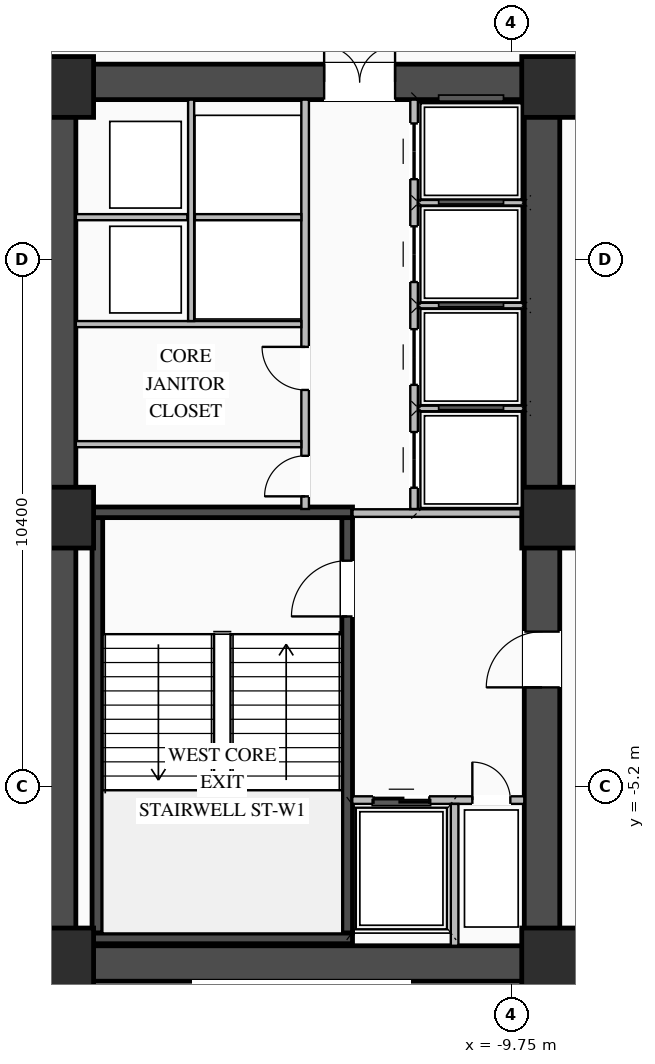
"""IFC4 building model, lengths in metres.
Left out: names, types, materials, properties, quantities, classifications, styles, units other than length and angle.
Written with IfcOpenShell. Run it as: python <this file> out.ifc"""

import sys

from ifc_helpers import new_model, si_unit, direction, frame, frame_2d, origin, origin_2d, place, context, subcontext, project, spatial, rectangle, extrude, element, fill, save


model = new_model("IFC4")
c1 = context("Model", 3, precision=1e-05, world=origin(), true_north=direction((0.0, 1.0)))
c2 = subcontext(c1, "Body", "Model", "MODEL_VIEW")
j1 = project(units=[si_unit("LENGTHUNIT", "METRE"), si_unit("PLANEANGLEUNIT", "RADIAN")], contexts=[c1])
p1 = place(None, origin())
s1 = spatial("IfcSite", under=j1, at=p1, CompositionType="ELEMENT")
p2 = place(p1, origin())
s2 = spatial("IfcBuilding", under=s1, at=p2, CompositionType="ELEMENT")
p3 = place(p2, frame((0.0, 0.0, 14.1)))
s3 = spatial("IfcBuildingStorey", under=s2, at=p3, CompositionType="ELEMENT", Elevation=14.1)
p4 = place(p3, frame((-19.05, -8.7, 0.0), z_axis=(0.0, 0.0, 1.0), x_axis=(1.0, 0.0, 0.0)))
e1 = element("IfcWall", 1, at=p4, inside=s3, PredefinedType="SHEAR", context=c2, shape_type="SweptSolid", body=[
    extrude(rectangle(XDim=10.25, YDim=0.7, at=frame_2d((5.125, 0.0))), origin(), (0.0, 0.0, 1.0), 4.25),
])
p5 = place(p3, frame((-19.05, 8.7, 0.0), z_axis=(0.0, 0.0, 1.0), x_axis=(1.0, 0.0, 0.0)))
e2 = element("IfcWall", 2, at=p5, inside=s3, PredefinedType="SHEAR", context=c2, shape_type="SweptSolid", body=[
    extrude(rectangle(XDim=10.25, YDim=0.7, at=frame_2d((5.125, 0.0))), origin(), (0.0, 0.0, 1.0), 4.25),
])
p6 = place(p5, frame((5.6, 0.0, 0.0)))
e3 = element("IfcOpeningElement", 3, at=p6, cuts=e2, PredefinedType="OPENING", context=c2, shape_type="SweptSolid", body=[
    extrude(rectangle(XDim=1.4, YDim=2.05, at=frame_2d((0.7, 1.025))), frame((0.0, 0.36, 0.0), z_axis=(0.0, -1.0, 0.0), x_axis=(1.0, 0.0, 0.0)), (0.0, 0.0, 1.0), 0.72),
])
p7 = place(p3, frame((-18.7, -8.35, 0.0), z_axis=(0.0, 0.0, 1.0), x_axis=(0.0, 1.0, 0.0)))
e4 = element("IfcWall", 4, at=p7, inside=s3, PredefinedType="SHEAR", context=c2, shape_type="SweptSolid", body=[
    extrude(rectangle(XDim=16.7, YDim=0.7, at=frame_2d((8.35, 0.0))), origin(), (0.0, 0.0, 1.0), 4.25),
])
p8 = place(p3, frame((-9.15, -8.35, 0.0), z_axis=(0.0, 0.0, 1.0), x_axis=(0.0, 1.0, 0.0)))
e5 = element("IfcWall", 5, at=p8, inside=s3, PredefinedType="SHEAR", context=c2, shape_type="SweptSolid", body=[
    extrude(rectangle(XDim=16.7, YDim=0.7, at=frame_2d((8.35, 0.0))), origin(), (0.0, 0.0, 1.0), 4.25),
])
p9 = place(p8, frame((5.1, 0.0, 0.0)))
e6 = element("IfcOpeningElement", 6, at=p9, cuts=e5, PredefinedType="OPENING", context=c2, shape_type="SweptSolid", body=[
    extrude(rectangle(XDim=1.1, YDim=2.08, at=frame_2d((0.55, 1.04))), frame((0.0, 0.36, 0.0), z_axis=(0.0, -1.0, 0.0), x_axis=(1.0, 0.0, 0.0)), (0.0, 0.0, 1.0), 0.72),
])
p10 = place(p3, frame((-12.995, -8.1, 0.0), z_axis=(0.0, 0.0, 1.0), x_axis=(0.0, 1.0, 0.0)))
e7 = element("IfcWall", 7, at=p10, inside=s3, PredefinedType="SHEAR", context=c2, shape_type="SweptSolid", body=[
    extrude(rectangle(XDim=8.2, YDim=0.21, at=frame_2d((4.1, 0.0))), origin(), (0.0, 0.0, 1.0), 4.25),
])
p11 = place(p10, frame((6.25, 0.0, 0.0)))
e8 = element("IfcOpeningElement", 8, at=p11, cuts=e7, PredefinedType="OPENING", context=c2, shape_type="SweptSolid", body=[
    extrude(rectangle(XDim=1.1, YDim=2.15, at=frame_2d((0.55, 1.075))), frame((0.0, 0.115, 0.0), z_axis=(0.0, -1.0, 0.0), x_axis=(1.0, 0.0, 0.0)), (0.0, 0.0, 1.0), 0.23),
])
p12 = place(p3, frame((-17.925, -8.1, 0.0), z_axis=(0.0, 0.0, 1.0), x_axis=(0.0, 1.0, 0.0)))
e9 = element("IfcWall", 9, at=p12, inside=s3, PredefinedType="SHEAR", context=c2, shape_type="SweptSolid", body=[
    extrude(rectangle(XDim=8.2, YDim=0.21, at=frame_2d((4.1, 0.0))), origin(), (0.0, 0.0, 1.0), 4.25),
])
for number, where, z_axis, x_axis in (
    (10, (-18.03, -8.205, 0.0), (0.0, 0.0, 1.0), (1.0, 0.0, 0.0)),
    (11, (-12.89, 0.205, 0.0), (0.0, 0.0, 1.0), (-1.0, 0.0, 0.0)),
):
    element("IfcWall", number, at=place(p3, frame(where, z_axis=z_axis, x_axis=x_axis)), inside=s3, PredefinedType="SHEAR", context=c2, shape_type="SweptSolid", body=[
        extrude(rectangle(XDim=5.14, YDim=0.21, at=frame_2d((2.57, 0.0))), origin(), (0.0, 0.0, 1.0), 4.25),
    ])
for number, where, z_axis, x_axis in (
    (12, (-8.95, -8.6, 0.0), (0.0, 0.0, 1.0), (1.0, 0.0, 0.0)),
    (13, (-8.95, 0.1, 0.0), (0.0, 0.0, 1.0), (1.0, 0.0, 0.0)),
    (14, (-8.95, 8.6, 0.0), (0.0, 0.0, 1.0), (1.0, 0.0, 0.0)),
    (15, (-18.6, -8.6, 0.0), (0.0, 0.0, 1.0), (1.0, 0.0, 0.0)),
    (16, (-18.6, 0.1, 0.0), (0.0, 0.0, 1.0), (1.0, 0.0, 0.0)),
    (17, (-18.6, 8.6, 0.0), (0.0, 0.0, 1.0), (1.0, 0.0, 0.0)),
):
    element("IfcColumn", number, at=place(p3, frame(where, z_axis=z_axis, x_axis=x_axis)), inside=s3, PredefinedType="COLUMN", context=c2, shape_type="SweptSolid", body=[
        extrude(rectangle(XDim=1.2, YDim=1.2, at=origin_2d()), origin(), (0.0, 0.0, 1.0), 4.5),
    ])
p13 = place(p3, frame((-12.895, -5.475, 0.0), z_axis=(0.0, 0.0, 1.0), x_axis=(1.0, 0.0, 0.0)))
e18 = element("IfcWall", 18, at=p13, inside=s3, PredefinedType="STANDARD", context=c2, shape_type="SweptSolid", body=[
    extrude(rectangle(XDim=3.395, YDim=0.15, at=frame_2d((1.698, 0.0))), origin(), (0.0, 0.0, 1.0), 4.23),
])
p14 = place(p13, frame((0.42, 0.0, 0.0)))
e19 = element("IfcOpeningElement", 19, at=p14, cuts=e18, PredefinedType="OPENING", context=c2, shape_type="SweptSolid", body=[
    extrude(rectangle(XDim=1.1, YDim=2.15, at=frame_2d((0.55, 1.075))), frame((0.0, 0.085, 0.0), z_axis=(0.0, -1.0, 0.0), x_axis=(1.0, 0.0, 0.0)), (0.0, 0.0, 1.0), 0.17),
])
p15 = place(p13, frame((2.37, 0.0, 0.0)))
e20 = element("IfcOpeningElement", 20, at=p15, cuts=e18, PredefinedType="OPENING", context=c2, shape_type="SweptSolid", body=[
    extrude(rectangle(XDim=0.75, YDim=2.05, at=frame_2d((0.375, 1.025))), frame((0.0, 0.085, 0.0), z_axis=(0.0, -1.0, 0.0), x_axis=(1.0, 0.0, 0.0)), (0.0, 0.0, 1.0), 0.17),
])
p16 = place(p3, frame((-10.875, -8.35, 0.0), z_axis=(0.0, 0.0, 1.0), x_axis=(0.0, 1.0, 0.0)))
e21 = element("IfcWall", 21, at=p16, inside=s3, PredefinedType="STANDARD", context=c2, shape_type="SweptSolid", body=[
    extrude(rectangle(XDim=2.8, YDim=0.15, at=frame_2d((1.4, 0.0))), origin(), (0.0, 0.0, 1.0), 4.23),
])
p17 = place(p3, frame((-12.89, 0.19, 0.0), z_axis=(0.0, 0.0, 1.0), x_axis=(1.0, 0.0, 0.0)))
e22 = element("IfcWall", 22, at=p17, inside=s3, PredefinedType="STANDARD", context=c2, shape_type="SweptSolid", body=[
    extrude(rectangle(XDim=3.39, YDim=0.15, at=frame_2d((1.695, 0.0))), origin(), (0.0, 0.0, 1.0), 3.525),
])
p18 = place(p3, frame((-11.675, 0.27, 0.0), z_axis=(0.0, 0.0, 1.0), x_axis=(0.0, 1.0, 0.0)))
e23 = element("IfcWall", 23, at=p18, inside=s3, PredefinedType="STANDARD", context=c2, shape_type="SweptSolid", body=[
    extrude(rectangle(XDim=8.08, YDim=0.15, at=frame_2d((4.04, 0.0))), origin(), (0.0, 0.0, 1.0), 4.23),
])
p19 = place(p18, frame((0.42, 0.0, 0.0)))
e24 = element("IfcOpeningElement", 24, at=p19, cuts=e23, PredefinedType="OPENING", context=c2, shape_type="SweptSolid", body=[
    extrude(rectangle(XDim=1.1, YDim=2.1, at=frame_2d((0.55, 1.05))), frame((0.0, 0.085, 0.0), z_axis=(0.0, -1.0, 0.0), x_axis=(1.0, 0.0, 0.0)), (0.0, 0.0, 1.0), 0.17),
])
p20 = place(p18, frame((2.45, 0.0, 0.0)))
e25 = element("IfcOpeningElement", 25, at=p20, cuts=e23, PredefinedType="OPENING", context=c2, shape_type="SweptSolid", body=[
    extrude(rectangle(XDim=1.1, YDim=2.1, at=frame_2d((0.55, 1.05))), frame((0.0, 0.085, 0.0), z_axis=(0.0, -1.0, 0.0), x_axis=(1.0, 0.0, 0.0)), (0.0, 0.0, 1.0), 0.17),
])
p21 = place(p18, frame((4.48, 0.0, 0.0)))
e26 = element("IfcOpeningElement", 26, at=p21, cuts=e23, PredefinedType="OPENING", context=c2, shape_type="SweptSolid", body=[
    extrude(rectangle(XDim=1.1, YDim=2.1, at=frame_2d((0.55, 1.05))), frame((0.0, 0.085, 0.0), z_axis=(0.0, -1.0, 0.0), x_axis=(1.0, 0.0, 0.0)), (0.0, 0.0, 1.0), 0.17),
])
p22 = place(p18, frame((6.51, 0.0, 0.0)))
e27 = element("IfcOpeningElement", 27, at=p22, cuts=e23, PredefinedType="OPENING", context=c2, shape_type="SweptSolid", body=[
    extrude(rectangle(XDim=1.1, YDim=2.1, at=frame_2d((0.55, 1.05))), frame((0.0, 0.085, 0.0), z_axis=(0.0, -1.0, 0.0), x_axis=(1.0, 0.0, 0.0)), (0.0, 0.0, 1.0), 0.17),
])
for number, where, z_axis, x_axis in (
    (28, (-11.6, 2.255, 0.0), (0.0, 0.0, 1.0), (1.0, 0.0, 0.0)),
    (29, (-11.6, 4.285, 0.0), (0.0, 0.0, 1.0), (1.0, 0.0, 0.0)),
    (30, (-11.6, 6.315, 0.0), (0.0, 0.0, 1.0), (1.0, 0.0, 0.0)),
):
    element("IfcWall", number, at=place(p3, frame(where, z_axis=z_axis, x_axis=x_axis)), inside=s3, PredefinedType="STANDARD", context=c2, shape_type="SweptSolid", body=[
        extrude(rectangle(XDim=2.1, YDim=0.11, at=frame_2d((1.05, 0.0))), origin(), (0.0, 0.0, 1.0), 4.23),
    ])
p23 = place(p3, frame((-13.825, 0.27, 0.0), z_axis=(0.0, 0.0, 1.0), x_axis=(0.0, 1.0, 0.0)))
e31 = element("IfcWall", 31, at=p23, inside=s3, PredefinedType="STANDARD", context=c2, shape_type="SweptSolid", body=[
    extrude(rectangle(XDim=8.08, YDim=0.15, at=frame_2d((4.04, 0.0))), origin(), (0.0, 0.0, 1.0), 4.23),
])
p24 = place(p23, frame((0.25, 0.0, 0.0)))
e32 = element("IfcOpeningElement", 32, at=p24, cuts=e31, PredefinedType="OPENING", context=c2, shape_type="SweptSolid", body=[
    extrude(rectangle(XDim=0.8, YDim=2.05, at=frame_2d((0.4, 1.025))), frame((0.0, 0.085, 0.0), z_axis=(0.0, -1.0, 0.0), x_axis=(1.0, 0.0, 0.0)), (0.0, 0.0, 1.0), 0.17),
])
p25 = place(p23, frame((2.35, 0.0, 0.0)))
e33 = element("IfcOpeningElement", 33, at=p25, cuts=e31, PredefinedType="OPENING", context=c2, shape_type="SweptSolid", body=[
    extrude(rectangle(XDim=0.85, YDim=2.05, at=frame_2d((0.425, 1.025))), frame((0.0, 0.085, 0.0), z_axis=(0.0, -1.0, 0.0), x_axis=(1.0, 0.0, 0.0)), (0.0, 0.0, 1.0), 0.17),
])
p26 = place(p3, frame((-18.35, 3.92, 0.0), z_axis=(0.0, 0.0, 1.0), x_axis=(1.0, 0.0, 0.0)))
e34 = element("IfcWall", 34, at=p26, inside=s3, PredefinedType="STANDARD", context=c2, shape_type="SweptSolid", body=[
    extrude(rectangle(XDim=4.45, YDim=0.12, at=frame_2d((2.225, 0.0))), origin(), (0.0, 0.0, 1.0), 4.23),
])
p27 = place(p3, frame((-18.35, 6.03, 0.0), z_axis=(0.0, 0.0, 1.0), x_axis=(1.0, 0.0, 0.0)))
e35 = element("IfcWall", 35, at=p27, inside=s3, PredefinedType="STANDARD", context=c2, shape_type="SweptSolid", body=[
    extrude(rectangle(XDim=2.2, YDim=0.12, at=frame_2d((1.1, 0.0))), origin(), (0.0, 0.0, 1.0), 4.23),
])
p28 = place(p3, frame((-16.075, 3.98, 0.0), z_axis=(0.0, 0.0, 1.0), x_axis=(0.0, 1.0, 0.0)))
e36 = element("IfcWall", 36, at=p28, inside=s3, PredefinedType="STANDARD", context=c2, shape_type="SweptSolid", body=[
    extrude(rectangle(XDim=4.37, YDim=0.12, at=frame_2d((2.185, 0.0))), origin(), (0.0, 0.0, 1.0), 4.23),
])
p29 = place(p3, frame((-16.0, 6.03, 0.0), z_axis=(0.0, 0.0, 1.0), x_axis=(1.0, 0.0, 0.0)))
e37 = element("IfcWall", 37, at=p29, inside=s3, PredefinedType="STANDARD", context=c2, shape_type="SweptSolid", body=[
    extrude(rectangle(XDim=2.1, YDim=0.12, at=frame_2d((1.05, 0.0))), origin(), (0.0, 0.0, 1.0), 4.23),
])
p30 = place(p3, frame((-18.35, 1.55, 0.0), z_axis=(0.0, 0.0, 1.0), x_axis=(1.0, 0.0, 0.0)))
e38 = element("IfcWall", 38, at=p30, inside=s3, PredefinedType="STANDARD", context=c2, shape_type="SweptSolid", body=[
    extrude(rectangle(XDim=4.45, YDim=0.12, at=frame_2d((2.225, 0.0))), origin(), (0.0, 0.0, 1.0), 4.23),
])
p31 = place(p11, origin())
e39 = element("IfcDoor", 39, at=p31, inside=s3, OperationType="SINGLE_SWING_LEFT", PredefinedType="DOOR", context=c2, shape_type="SweptSolid", body=[
    extrude(rectangle(XDim=1.1, YDim=2.15, at=frame_2d((0.55, 1.075))), frame((0.0, 0.025, 0.0), z_axis=(0.0, -1.0, 0.0), x_axis=(1.0, 0.0, 0.0)), (0.0, 0.0, 1.0), 0.05),
])
fill(e8, e39)
p32 = place(p14, origin())
e40 = element("IfcDoor", 40, at=p32, inside=s3, OperationType="DOUBLE_DOOR_SLIDING", PredefinedType="DOOR", context=c2, shape_type="SweptSolid", body=[
    extrude(rectangle(XDim=1.1, YDim=2.15, at=frame_2d((0.55, 1.075))), frame((0.0, 0.025, 0.0), z_axis=(0.0, -1.0, 0.0), x_axis=(1.0, 0.0, 0.0)), (0.0, 0.0, 1.0), 0.05),
])
fill(e19, e40)
p33 = place(p15, origin())
e41 = element("IfcDoor", 41, at=p33, inside=s3, OperationType="SINGLE_SWING_LEFT", PredefinedType="DOOR", context=c2, shape_type="SweptSolid", body=[
    extrude(rectangle(XDim=0.75, YDim=2.05, at=frame_2d((0.375, 1.025))), frame((0.0, 0.025, 0.0), z_axis=(0.0, -1.0, 0.0), x_axis=(1.0, 0.0, 0.0)), (0.0, 0.0, 1.0), 0.05),
])
fill(e20, e41)
p34 = place(p9, origin())
e42 = element("IfcDoor", 42, at=p34, inside=s3, OperationType="SINGLE_SWING_LEFT", PredefinedType="DOOR", context=c2, shape_type="SweptSolid", body=[
    extrude(rectangle(XDim=1.1, YDim=2.08, at=frame_2d((0.55, 1.04))), frame((0.0, 0.305, 0.0), z_axis=(0.0, -1.0, 0.0), x_axis=(1.0, 0.0, 0.0)), (0.0, 0.0, 1.0), 0.05),
])
fill(e6, e42)
p35 = place(p6, origin())
e43 = element("IfcDoor", 43, at=p35, inside=s3, OperationType="DOUBLE_DOOR_SINGLE_SWING", PredefinedType="DOOR", context=c2, shape_type="SweptSolid", body=[
    extrude(rectangle(XDim=1.4, YDim=2.05, at=frame_2d((0.7, 1.025))), frame((0.0, 0.295, 0.0), z_axis=(0.0, -1.0, 0.0), x_axis=(1.0, 0.0, 0.0)), (0.0, 0.0, 1.0), 0.05),
])
fill(e3, e43)
p36 = place(p19, origin())
e44 = element("IfcDoor", 44, at=p36, inside=s3, OperationType="DOUBLE_DOOR_SLIDING", PredefinedType="DOOR", context=c2, shape_type="SweptSolid", body=[
    extrude(rectangle(XDim=1.1, YDim=2.1, at=frame_2d((0.55, 1.05))), frame((0.0, 0.025, 0.0), z_axis=(0.0, -1.0, 0.0), x_axis=(1.0, 0.0, 0.0)), (0.0, 0.0, 1.0), 0.05),
])
fill(e24, e44)
p37 = place(p20, origin())
e45 = element("IfcDoor", 45, at=p37, inside=s3, OperationType="DOUBLE_DOOR_SLIDING", PredefinedType="DOOR", context=c2, shape_type="SweptSolid", body=[
    extrude(rectangle(XDim=1.1, YDim=2.1, at=frame_2d((0.55, 1.05))), frame((0.0, 0.025, 0.0), z_axis=(0.0, -1.0, 0.0), x_axis=(1.0, 0.0, 0.0)), (0.0, 0.0, 1.0), 0.05),
])
fill(e25, e45)
p38 = place(p21, origin())
e46 = element("IfcDoor", 46, at=p38, inside=s3, OperationType="DOUBLE_DOOR_SLIDING", PredefinedType="DOOR", context=c2, shape_type="SweptSolid", body=[
    extrude(rectangle(XDim=1.1, YDim=2.1, at=frame_2d((0.55, 1.05))), frame((0.0, 0.025, 0.0), z_axis=(0.0, -1.0, 0.0), x_axis=(1.0, 0.0, 0.0)), (0.0, 0.0, 1.0), 0.05),
])
fill(e26, e46)
p39 = place(p22, origin())
e47 = element("IfcDoor", 47, at=p39, inside=s3, OperationType="DOUBLE_DOOR_SLIDING", PredefinedType="DOOR", context=c2, shape_type="SweptSolid", body=[
    extrude(rectangle(XDim=1.1, YDim=2.1, at=frame_2d((0.55, 1.05))), frame((0.0, 0.025, 0.0), z_axis=(0.0, -1.0, 0.0), x_axis=(1.0, 0.0, 0.0)), (0.0, 0.0, 1.0), 0.05),
])
fill(e27, e47)
p40 = place(p24, origin())
e48 = element("IfcDoor", 48, at=p40, inside=s3, OperationType="SINGLE_SWING_LEFT", PredefinedType="DOOR", context=c2, shape_type="SweptSolid", body=[
    extrude(rectangle(XDim=0.8, YDim=2.05, at=frame_2d((0.4, 1.025))), frame((0.0, 0.025, 0.0), z_axis=(0.0, -1.0, 0.0), x_axis=(1.0, 0.0, 0.0)), (0.0, 0.0, 1.0), 0.05),
])
fill(e32, e48)
p41 = place(p25, origin())
e49 = element("IfcDoor", 49, at=p41, inside=s3, OperationType="SINGLE_SWING_RIGHT", PredefinedType="DOOR", context=c2, shape_type="SweptSolid", body=[
    extrude(rectangle(XDim=0.85, YDim=2.05, at=frame_2d((0.425, 1.025))), frame((0.0, 0.025, 0.0), z_axis=(0.0, -1.0, 0.0), x_axis=(1.0, 0.0, 0.0)), (0.0, 0.0, 1.0), 0.05),
])
fill(e33, e49)
save(model, sys.argv[1])
